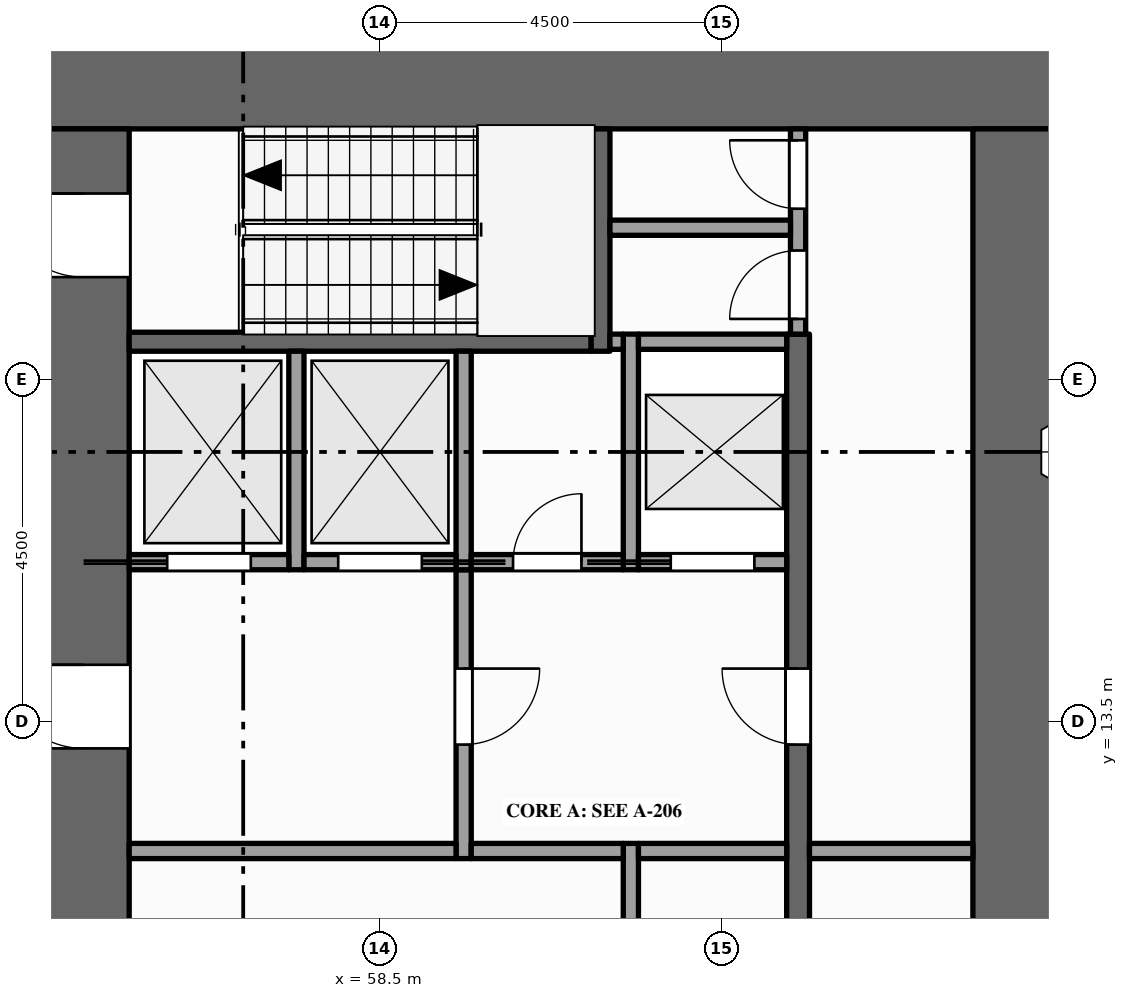
"""IFC4 building model, lengths in metres.
Left out: names, types, materials, properties, quantities, classifications, styles, units other than length and angle.
Written with IfcOpenShell. Run it as: python <this file> out.ifc"""

import sys

from ifc_helpers import new_model, si_unit, direction, frame, frame_2d, origin, place, context, subcontext, project, spatial, rectangle, extrude, element, fill, save


model = new_model("IFC4")
c1 = context("Model", 3, precision=1e-05, world=origin(), true_north=direction((0.0, 1.0)))
c2 = subcontext(c1, "Body", "Model", "MODEL_VIEW")
j1 = project(units=[si_unit("LENGTHUNIT", "METRE"), si_unit("PLANEANGLEUNIT", "RADIAN")], contexts=[c1])
p1 = place(None, origin())
s1 = spatial("IfcSite", under=j1, at=p1, CompositionType="ELEMENT")
p2 = place(p1, origin())
s2 = spatial("IfcBuilding", under=s1, at=p2, CompositionType="ELEMENT")
p3 = place(p2, frame((0.0, 0.0, 29.0)))
s3 = spatial("IfcBuildingStorey", under=s2, at=p3, CompositionType="ELEMENT", Elevation=29.0)
p4 = place(p3, frame((54.0, 21.9, -0.15), z_axis=(0.0, 0.0, 1.0), x_axis=(1.0, 0.0, 0.0)))
e1 = element("IfcWall", 1, at=p4, inside=s3, PredefinedType="SHEAR", context=c2, shape_type="SweptSolid", body=[
    extrude(rectangle(XDim=13.5, YDim=1.2, at=frame_2d((6.75, 0.0))), origin(), (0.0, 0.0, 1.0), 4.0),
])
p5 = place(p3, frame((54.6, 1.2, -0.15), z_axis=(0.0, 0.0, 1.0), x_axis=(0.0, 1.0, 0.0)))
e2 = element("IfcWall", 2, at=p5, inside=s3, PredefinedType="SHEAR", context=c2, shape_type="SweptSolid", body=[
    extrude(rectangle(XDim=20.1, YDim=1.2, at=frame_2d((10.05, 0.0))), origin(), (0.0, 0.0, 1.0), 4.0),
])
p6 = place(p5, frame((5.9, 0.0, 0.15)))
e3 = element("IfcOpeningElement", 3, at=p6, cuts=e2, PredefinedType="OPENING", context=c2, shape_type="SweptSolid", body=[
    extrude(rectangle(XDim=1.8, YDim=2.1, at=frame_2d((0.9, 1.05))), frame((0.0, 0.61, 0.0), z_axis=(0.0, -1.0, 0.0), x_axis=(1.0, 0.0, 0.0)), (0.0, 0.0, 1.0), 1.22),
])
p7 = place(p5, frame((11.95, 0.0, 0.15)))
e4 = element("IfcOpeningElement", 4, at=p7, cuts=e2, PredefinedType="OPENING", context=c2, shape_type="SweptSolid", body=[
    extrude(rectangle(XDim=1.1, YDim=2.1, at=frame_2d((0.55, 1.05))), frame((0.0, 0.61, 0.0), z_axis=(0.0, -1.0, 0.0), x_axis=(1.0, 0.0, 0.0)), (0.0, 0.0, 1.0), 1.22),
])
p8 = place(p5, frame((0.95, 0.0, 0.15)))
e5 = element("IfcOpeningElement", 5, at=p8, cuts=e2, PredefinedType="OPENING", context=c2, shape_type="SweptSolid", body=[
    extrude(rectangle(XDim=1.1, YDim=2.1, at=frame_2d((0.55, 1.05))), frame((0.0, 0.61, 0.0), z_axis=(0.0, -1.0, 0.0), x_axis=(1.0, 0.0, 0.0)), (0.0, 0.0, 1.0), 1.22),
])
p9 = place(p5, frame((18.15, 0.0, 0.15)))
e6 = element("IfcOpeningElement", 6, at=p9, cuts=e2, PredefinedType="OPENING", context=c2, shape_type="SweptSolid", body=[
    extrude(rectangle(XDim=1.1, YDim=2.1, at=frame_2d((0.55, 1.05))), frame((0.0, 0.61, 0.0), z_axis=(0.0, -1.0, 0.0), x_axis=(1.0, 0.0, 0.0)), (0.0, 0.0, 1.0), 1.22),
])
p10 = place(p3, frame((66.9, 1.2, -0.15), z_axis=(0.0, 0.0, 1.0), x_axis=(0.0, 1.0, 0.0)))
e7 = element("IfcWall", 7, at=p10, inside=s3, PredefinedType="SHEAR", context=c2, shape_type="SweptSolid", body=[
    extrude(rectangle(XDim=20.1, YDim=1.2, at=frame_2d((10.05, 0.0))), origin(), (0.0, 0.0, 1.0), 4.0),
])
p11 = place(p3, frame((57.4, 15.5, 0.0), z_axis=(0.0, 0.0, 1.0), x_axis=(0.0, 1.0, 0.0)))
e8 = element("IfcWall", 8, at=p11, inside=s3, PredefinedType="SOLIDWALL", context=c2, shape_type="SweptSolid", body=[
    extrude(rectangle(XDim=2.875, YDim=0.2, at=frame_2d((1.438, 0.0))), origin(), (0.0, 0.0, 1.0), 3.85),
])
p12 = place(p3, frame((59.6, 11.7, 0.0), z_axis=(0.0, 0.0, 1.0), x_axis=(0.0, 1.0, 0.0)))
e9 = element("IfcWall", 9, at=p12, inside=s3, PredefinedType="PARTITIONING", context=c2, shape_type="SweptSolid", body=[
    extrude(rectangle(XDim=3.8, YDim=0.2, at=frame_2d((1.9, 0.0))), origin(), (0.0, 0.0, 1.0), 3.85),
])
p13 = place(p12, frame((1.5, 0.0, 0.0)))
e10 = element("IfcOpeningElement", 10, at=p13, cuts=e9, PredefinedType="OPENING", context=c2, shape_type="SweptSolid", body=[
    extrude(rectangle(XDim=1.0, YDim=2.1, at=frame_2d((0.5, 1.05))), frame((0.0, 0.11, 0.0), z_axis=(0.0, -1.0, 0.0), x_axis=(1.0, 0.0, 0.0)), (0.0, 0.0, 1.0), 0.22),
])
p14 = place(p3, frame((59.6, 15.5, 0.0), z_axis=(0.0, 0.0, 1.0), x_axis=(0.0, 1.0, 0.0)))
e11 = element("IfcWall", 11, at=p14, inside=s3, PredefinedType="SOLIDWALL", context=c2, shape_type="SweptSolid", body=[
    extrude(rectangle(XDim=2.875, YDim=0.2, at=frame_2d((1.438, 0.0))), origin(), (0.0, 0.0, 1.0), 3.85),
])
p15 = place(p3, frame((61.4, 18.375, 0.0), z_axis=(0.0, 0.0, 1.0), x_axis=(0.0, 1.0, 0.0)))
e12 = element("IfcWall", 12, at=p15, inside=s3, PredefinedType="SHEAR", context=c2, shape_type="SweptSolid", body=[
    extrude(rectangle(XDim=2.925, YDim=0.25, at=frame_2d((1.462, 0.0))), origin(), (0.0, 0.0, 1.0), 3.85),
])
p16 = place(p3, frame((61.8, 9.3, 0.0), z_axis=(0.0, 0.0, 1.0), x_axis=(0.0, 1.0, 0.0)))
e13 = element("IfcWall", 13, at=p16, inside=s3, PredefinedType="PARTITIONING", context=c2, shape_type="SweptSolid", body=[
    extrude(rectangle(XDim=2.6, YDim=0.2, at=frame_2d((1.3, 0.0))), origin(), (0.0, 0.0, 1.0), 3.85),
])
p17 = place(p3, frame((61.8, 15.5, 0.0), z_axis=(0.0, 0.0, 1.0), x_axis=(0.0, 1.0, 0.0)))
e14 = element("IfcWall", 14, at=p17, inside=s3, PredefinedType="SOLIDWALL", context=c2, shape_type="SweptSolid", body=[
    extrude(rectangle(XDim=3.1, YDim=0.2, at=frame_2d((1.55, 0.0))), origin(), (0.0, 0.0, 1.0), 3.85),
])
p18 = place(p3, frame((64.0, 4.1, 0.0), z_axis=(0.0, 0.0, 1.0), x_axis=(0.0, 1.0, 0.0)))
e15 = element("IfcWall", 15, at=p18, inside=s3, PredefinedType="SHEAR", context=c2, shape_type="SweptSolid", body=[
    extrude(rectangle(XDim=14.5, YDim=0.3, at=frame_2d((7.25, 0.0))), origin(), (0.0, 0.0, 1.0), 3.85),
])
p19 = place(p18, frame((3.4, 0.0, 0.0)))
e16 = element("IfcOpeningElement", 16, at=p19, cuts=e15, PredefinedType="OPENING", context=c2, shape_type="SweptSolid", body=[
    extrude(rectangle(XDim=1.0, YDim=2.1, at=frame_2d((0.5, 1.05))), frame((0.0, 0.16, 0.0), z_axis=(0.0, -1.0, 0.0), x_axis=(1.0, 0.0, 0.0)), (0.0, 0.0, 1.0), 0.32),
])
p20 = place(p18, frame((9.1, 0.0, 0.0)))
e17 = element("IfcOpeningElement", 17, at=p20, cuts=e15, PredefinedType="OPENING", context=c2, shape_type="SweptSolid", body=[
    extrude(rectangle(XDim=1.0, YDim=2.1, at=frame_2d((0.5, 1.05))), frame((0.0, 0.16, 0.0), z_axis=(0.0, -1.0, 0.0), x_axis=(1.0, 0.0, 0.0)), (0.0, 0.0, 1.0), 0.32),
])
p21 = place(p3, frame((64.0, 18.6, 0.0), z_axis=(0.0, 0.0, 1.0), x_axis=(0.0, 1.0, 0.0)))
e18 = element("IfcWall", 18, at=p21, inside=s3, PredefinedType="PARTITIONING", context=c2, shape_type="SweptSolid", body=[
    extrude(rectangle(XDim=2.7, YDim=0.2, at=frame_2d((1.35, 0.0))), origin(), (0.0, 0.0, 1.0), 3.85),
])
p22 = place(p21, frame((0.2, 0.0, 0.0)))
e19 = element("IfcOpeningElement", 19, at=p22, cuts=e18, PredefinedType="OPENING", context=c2, shape_type="SweptSolid", body=[
    extrude(rectangle(XDim=0.9, YDim=2.1, at=frame_2d((0.45, 1.05))), frame((0.0, 0.11, 0.0), z_axis=(0.0, -1.0, 0.0), x_axis=(1.0, 0.0, 0.0)), (0.0, 0.0, 1.0), 0.22),
])
p23 = place(p21, frame((1.65, 0.0, 0.0)))
e20 = element("IfcOpeningElement", 20, at=p23, cuts=e18, PredefinedType="OPENING", context=c2, shape_type="SweptSolid", body=[
    extrude(rectangle(XDim=0.9, YDim=2.1, at=frame_2d((0.45, 1.05))), frame((0.0, 0.11, 0.0), z_axis=(0.0, -1.0, 0.0), x_axis=(1.0, 0.0, 0.0)), (0.0, 0.0, 1.0), 0.22),
])
p24 = place(p3, frame((55.2, 11.8, 0.0), z_axis=(0.0, 0.0, 1.0), x_axis=(1.0, 0.0, 0.0)))
e21 = element("IfcWall", 21, at=p24, inside=s3, PredefinedType="PARTITIONING", context=c2, shape_type="SweptSolid", body=[
    extrude(rectangle(XDim=4.3, YDim=0.2, at=frame_2d((2.15, 0.0))), origin(), (0.0, 0.0, 1.0), 3.85),
])
p25 = place(p3, frame((59.7, 11.8, 0.0), z_axis=(0.0, 0.0, 1.0), x_axis=(1.0, 0.0, 0.0)))
e22 = element("IfcWall", 22, at=p25, inside=s3, PredefinedType="PARTITIONING", context=c2, shape_type="SweptSolid", body=[
    extrude(rectangle(XDim=2.0, YDim=0.2, at=frame_2d((1.0, 0.0))), origin(), (0.0, 0.0, 1.0), 3.85),
])
p26 = place(p3, frame((61.9, 11.8, 0.0), z_axis=(0.0, 0.0, 1.0), x_axis=(1.0, 0.0, 0.0)))
e23 = element("IfcWall", 23, at=p26, inside=s3, PredefinedType="PARTITIONING", context=c2, shape_type="SweptSolid", body=[
    extrude(rectangle(XDim=1.95, YDim=0.2, at=frame_2d((0.975, 0.0))), origin(), (0.0, 0.0, 1.0), 3.85),
])
p27 = place(p3, frame((64.15, 11.8, 0.0), z_axis=(0.0, 0.0, 1.0), x_axis=(1.0, 0.0, 0.0)))
e24 = element("IfcWall", 24, at=p27, inside=s3, PredefinedType="PARTITIONING", context=c2, shape_type="SweptSolid", body=[
    extrude(rectangle(XDim=2.15, YDim=0.2, at=frame_2d((1.075, 0.0))), origin(), (0.0, 0.0, 1.0), 3.85),
])
p28 = place(p3, frame((55.2, 15.6, 0.0), z_axis=(0.0, 0.0, 1.0), x_axis=(1.0, 0.0, 0.0)))
e25 = element("IfcWall", 25, at=p28, inside=s3, PredefinedType="SOLIDWALL", context=c2, shape_type="SweptSolid", body=[
    extrude(rectangle(XDim=2.1, YDim=0.2, at=frame_2d((1.05, 0.0))), origin(), (0.0, 0.0, 1.0), 3.85),
])
p29 = place(p28, frame((0.5, 0.0, 0.012)))
e26 = element("IfcOpeningElement", 26, at=p29, cuts=e25, PredefinedType="OPENING", context=c2, shape_type="SweptSolid", body=[
    extrude(rectangle(XDim=1.1, YDim=2.1, at=frame_2d((0.55, 1.05))), frame((0.0, 0.11, 0.0), z_axis=(0.0, -1.0, 0.0), x_axis=(1.0, 0.0, 0.0)), (0.0, 0.0, 1.0), 0.22),
])
p30 = place(p3, frame((57.5, 15.6, 0.0), z_axis=(0.0, 0.0, 1.0), x_axis=(1.0, 0.0, 0.0)))
e27 = element("IfcWall", 27, at=p30, inside=s3, PredefinedType="SOLIDWALL", context=c2, shape_type="SweptSolid", body=[
    extrude(rectangle(XDim=2.0, YDim=0.2, at=frame_2d((1.0, 0.0))), origin(), (0.0, 0.0, 1.0), 3.85),
])
p31 = place(p30, frame((0.45, 0.0, 0.012)))
e28 = element("IfcOpeningElement", 28, at=p31, cuts=e27, PredefinedType="OPENING", context=c2, shape_type="SweptSolid", body=[
    extrude(rectangle(XDim=1.1, YDim=2.1, at=frame_2d((0.55, 1.05))), frame((0.0, 0.11, 0.0), z_axis=(0.0, -1.0, 0.0), x_axis=(1.0, 0.0, 0.0)), (0.0, 0.0, 1.0), 0.22),
])
p32 = place(p3, frame((59.7, 15.6, 0.0), z_axis=(0.0, 0.0, 1.0), x_axis=(1.0, 0.0, 0.0)))
e29 = element("IfcWall", 29, at=p32, inside=s3, PredefinedType="PARTITIONING", context=c2, shape_type="SweptSolid", body=[
    extrude(rectangle(XDim=2.0, YDim=0.2, at=frame_2d((1.0, 0.0))), origin(), (0.0, 0.0, 1.0), 3.85),
])
p33 = place(p32, frame((0.55, 0.0, 0.0)))
e30 = element("IfcOpeningElement", 30, at=p33, cuts=e29, PredefinedType="OPENING", context=c2, shape_type="SweptSolid", body=[
    extrude(rectangle(XDim=0.9, YDim=2.1, at=frame_2d((0.45, 1.05))), frame((0.0, 0.11, 0.0), z_axis=(0.0, -1.0, 0.0), x_axis=(1.0, 0.0, 0.0)), (0.0, 0.0, 1.0), 0.22),
])
p34 = place(p3, frame((61.9, 15.6, 0.0), z_axis=(0.0, 0.0, 1.0), x_axis=(1.0, 0.0, 0.0)))
e31 = element("IfcWall", 31, at=p34, inside=s3, PredefinedType="SOLIDWALL", context=c2, shape_type="SweptSolid", body=[
    extrude(rectangle(XDim=1.95, YDim=0.2, at=frame_2d((0.975, 0.0))), origin(), (0.0, 0.0, 1.0), 3.85),
])
p35 = place(p34, frame((0.425, 0.0, 0.012)))
e32 = element("IfcOpeningElement", 32, at=p35, cuts=e31, PredefinedType="OPENING", context=c2, shape_type="SweptSolid", body=[
    extrude(rectangle(XDim=1.1, YDim=2.1, at=frame_2d((0.55, 1.05))), frame((0.0, 0.11, 0.0), z_axis=(0.0, -1.0, 0.0), x_axis=(1.0, 0.0, 0.0)), (0.0, 0.0, 1.0), 0.22),
])
p36 = place(p3, frame((55.2, 18.5, 0.0), z_axis=(0.0, 0.0, 1.0), x_axis=(1.0, 0.0, 0.0)))
e33 = element("IfcWall", 33, at=p36, inside=s3, PredefinedType="SHEAR", context=c2, shape_type="SweptSolid", body=[
    extrude(rectangle(XDim=6.075, YDim=0.25, at=frame_2d((3.038, 0.0))), origin(), (0.0, 0.0, 1.0), 3.85),
])
p37 = place(p3, frame((61.525, 18.5, 0.0), z_axis=(0.0, 0.0, 1.0), x_axis=(1.0, 0.0, 0.0)))
e34 = element("IfcWall", 34, at=p37, inside=s3, PredefinedType="PARTITIONING", context=c2, shape_type="SweptSolid", body=[
    extrude(rectangle(XDim=0.175, YDim=0.2, at=frame_2d((0.087, 0.0))), origin(), (0.0, 0.0, 1.0), 3.85),
])
p38 = place(p3, frame((61.9, 18.5, 0.0), z_axis=(0.0, 0.0, 1.0), x_axis=(1.0, 0.0, 0.0)))
e35 = element("IfcWall", 35, at=p38, inside=s3, PredefinedType="SOLIDWALL", context=c2, shape_type="SweptSolid", body=[
    extrude(rectangle(XDim=1.95, YDim=0.2, at=frame_2d((0.975, 0.0))), origin(), (0.0, 0.0, 1.0), 3.85),
])
p39 = place(p3, frame((61.525, 20.0, 0.0), z_axis=(0.0, 0.0, 1.0), x_axis=(1.0, 0.0, 0.0)))
e36 = element("IfcWall", 36, at=p39, inside=s3, PredefinedType="PARTITIONING", context=c2, shape_type="SweptSolid", body=[
    extrude(rectangle(XDim=2.375, YDim=0.2, at=frame_2d((1.188, 0.0))), origin(), (0.0, 0.0, 1.0), 3.85),
])
p40 = place(p29, origin())
e37 = element("IfcDoor", 37, at=p40, inside=s3, OperationType="SLIDING_TO_LEFT", PredefinedType="DOOR", context=c2, shape_type="SweptSolid", body=[
    extrude(rectangle(XDim=1.1, YDim=2.1, at=frame_2d((0.55, 1.05))), frame((0.0, 0.025, 0.0), z_axis=(0.0, -1.0, 0.0), x_axis=(1.0, 0.0, 0.0)), (0.0, 0.0, 1.0), 0.05),
])
fill(e26, e37)
p41 = place(p31, origin())
e38 = element("IfcDoor", 38, at=p41, inside=s3, OperationType="SLIDING_TO_RIGHT", PredefinedType="DOOR", context=c2, shape_type="SweptSolid", body=[
    extrude(rectangle(XDim=1.1, YDim=2.1, at=frame_2d((0.55, 1.05))), frame((0.0, 0.025, 0.0), z_axis=(0.0, -1.0, 0.0), x_axis=(1.0, 0.0, 0.0)), (0.0, 0.0, 1.0), 0.05),
])
fill(e28, e38)
p42 = place(p35, origin())
e39 = element("IfcDoor", 39, at=p42, inside=s3, OperationType="SLIDING_TO_LEFT", PredefinedType="DOOR", context=c2, shape_type="SweptSolid", body=[
    extrude(rectangle(XDim=1.1, YDim=2.1, at=frame_2d((0.55, 1.05))), frame((0.0, 0.025, 0.0), z_axis=(0.0, -1.0, 0.0), x_axis=(1.0, 0.0, 0.0)), (0.0, 0.0, 1.0), 0.05),
])
fill(e32, e39)
p43 = place(p7, origin())
e40 = element("IfcDoor", 40, at=p43, inside=s3, OperationType="SINGLE_SWING_RIGHT", PredefinedType="DOOR", context=c2, shape_type="SweptSolid", body=[
    extrude(rectangle(XDim=1.1, YDim=2.1, at=frame_2d((0.55, 1.05))), frame((0.0, 0.025, 0.0), z_axis=(0.0, -1.0, 0.0), x_axis=(1.0, 0.0, 0.0)), (0.0, 0.0, 1.0), 0.05),
])
fill(e4, e40)
p44 = place(p13, origin())
e41 = element("IfcDoor", 41, at=p44, inside=s3, OperationType="SINGLE_SWING_RIGHT", PredefinedType="DOOR", context=c2, shape_type="SweptSolid", body=[
    extrude(rectangle(XDim=1.0, YDim=2.1, at=frame_2d((0.5, 1.05))), frame((0.0, 0.025, 0.0), z_axis=(0.0, -1.0, 0.0), x_axis=(1.0, 0.0, 0.0)), (0.0, 0.0, 1.0), 0.05),
])
fill(e10, e41)
p45 = place(p20, origin())
e42 = element("IfcDoor", 42, at=p45, inside=s3, OperationType="SINGLE_SWING_RIGHT", PredefinedType="DOOR", context=c2, shape_type="SweptSolid", body=[
    extrude(rectangle(XDim=1.0, YDim=2.1, at=frame_2d((0.5, 1.05))), frame((0.0, 0.025, 0.0), z_axis=(0.0, -1.0, 0.0), x_axis=(1.0, 0.0, 0.0)), (0.0, 0.0, 1.0), 0.05),
])
fill(e17, e42)
p46 = place(p9, origin())
e43 = element("IfcDoor", 43, at=p46, inside=s3, OperationType="SINGLE_SWING_RIGHT", PredefinedType="DOOR", context=c2, shape_type="SweptSolid", body=[
    extrude(rectangle(XDim=1.1, YDim=2.1, at=frame_2d((0.55, 1.05))), frame((0.0, 0.025, 0.0), z_axis=(0.0, -1.0, 0.0), x_axis=(1.0, 0.0, 0.0)), (0.0, 0.0, 1.0), 0.05),
])
fill(e6, e43)
p47 = place(p22, origin())
e44 = element("IfcDoor", 44, at=p47, inside=s3, OperationType="SINGLE_SWING_LEFT", PredefinedType="DOOR", context=c2, shape_type="SweptSolid", body=[
    extrude(rectangle(XDim=0.9, YDim=2.1, at=frame_2d((0.45, 1.05))), frame((0.0, 0.025, 0.0), z_axis=(0.0, -1.0, 0.0), x_axis=(1.0, 0.0, 0.0)), (0.0, 0.0, 1.0), 0.05),
])
fill(e19, e44)
p48 = place(p23, origin())
e45 = element("IfcDoor", 45, at=p48, inside=s3, OperationType="SINGLE_SWING_RIGHT", PredefinedType="DOOR", context=c2, shape_type="SweptSolid", body=[
    extrude(rectangle(XDim=0.9, YDim=2.1, at=frame_2d((0.45, 1.05))), frame((0.0, 0.025, 0.0), z_axis=(0.0, -1.0, 0.0), x_axis=(1.0, 0.0, 0.0)), (0.0, 0.0, 1.0), 0.05),
])
fill(e20, e45)
p49 = place(p33, origin())
e46 = element("IfcDoor", 46, at=p49, inside=s3, OperationType="SINGLE_SWING_RIGHT", PredefinedType="DOOR", context=c2, shape_type="SweptSolid", body=[
    extrude(rectangle(XDim=0.9, YDim=2.1, at=frame_2d((0.45, 1.05))), frame((0.0, 0.025, 0.0), z_axis=(0.0, -1.0, 0.0), x_axis=(1.0, 0.0, 0.0)), (0.0, 0.0, 1.0), 0.05),
])
fill(e30, e46)
save(model, sys.argv[1])
